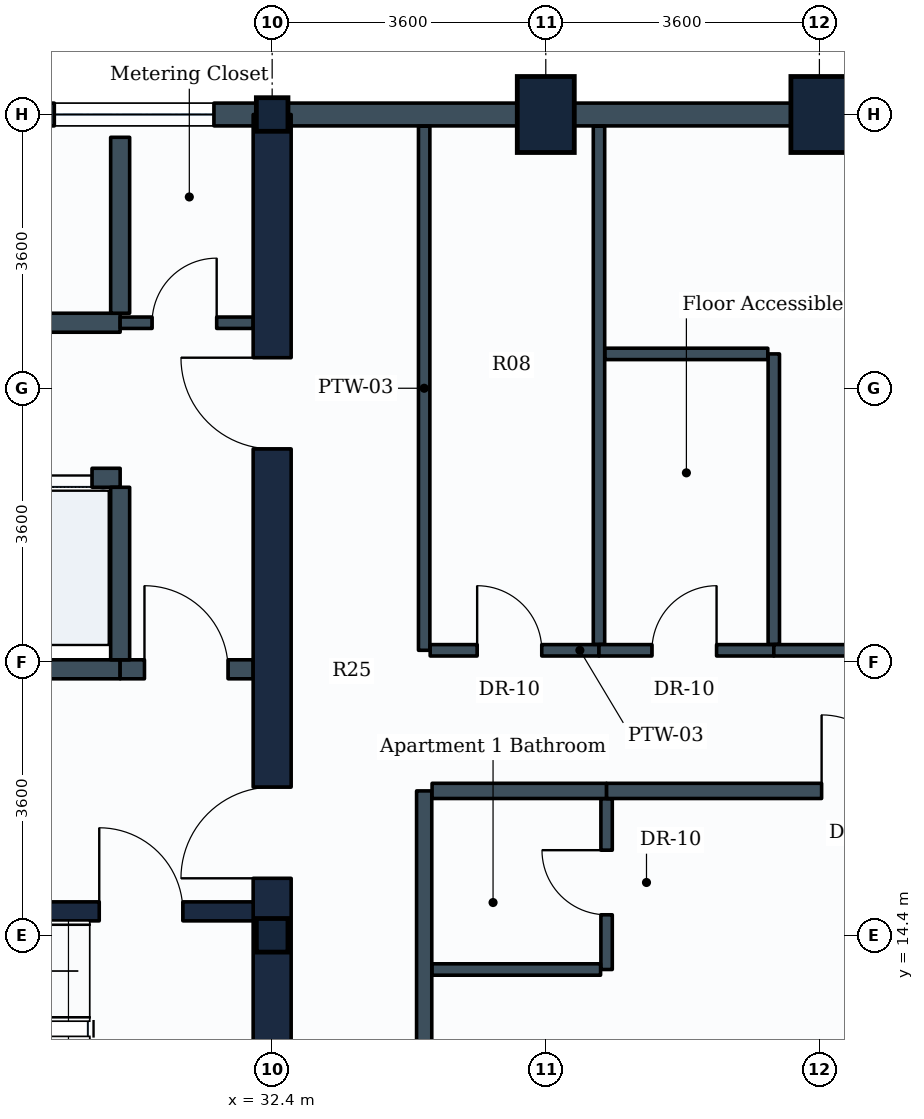
"""IFC4 building model, lengths in metres.
Left out: names, types, materials, properties, quantities, classifications, styles, units other than length and angle.
Written with IfcOpenShell. Run it as: python <this file> out.ifc"""

import sys

from ifc_helpers import new_model, si_unit, direction, frame, frame_2d, origin, origin_2d, place, context, subcontext, project, spatial, rectangle, i_section, extrude, element, fill, save


model = new_model("IFC4")
c1 = context("Model", 3, precision=1e-05, world=origin(), true_north=direction((0.0, 1.0)))
c2 = subcontext(c1, "Body", "Model", "MODEL_VIEW")
j1 = project(units=[si_unit("LENGTHUNIT", "METRE"), si_unit("PLANEANGLEUNIT", "RADIAN")], contexts=[c1])
p1 = place(None, origin())
s1 = spatial("IfcSite", under=j1, at=p1, CompositionType="ELEMENT")
p2 = place(p1, origin())
s2 = spatial("IfcBuilding", under=s1, at=p2, CompositionType="ELEMENT")
p3 = place(p2, frame((0.0, 0.0, 161.8)))
s3 = spatial("IfcBuildingStorey", under=s2, at=p3, CompositionType="ELEMENT", Elevation=161.8)
for number, where, z_axis, x_axis in (
    (1, (32.4, 14.4, 0.0), (0.0, 0.0, 1.0), (1.0, 0.0, 0.0)),
    (2, (32.4, 25.2, 0.0), (0.0, 0.0, 1.0), (1.0, 0.0, 0.0)),
):
    element("IfcColumn", number, at=place(p3, frame(where, z_axis=z_axis, x_axis=x_axis)), inside=s3, PredefinedType="COLUMN", context=c2, shape_type="SweptSolid", body=[
        extrude(i_section(OverallWidth=0.416, OverallDepth=0.442, WebThickness=0.025, FlangeThickness=0.041, FilletRadius=0.015, at=origin_2d()), origin(), (0.0, 0.0, 1.0), 3.8),
    ])
for number, where, z_axis, x_axis in (
    (3, (36.0, 25.2, 0.0), (0.0, 0.0, 1.0), (1.0, 0.0, 0.0)),
    (4, (39.6, 25.2, 0.0), (0.0, 0.0, 1.0), (1.0, 0.0, 0.0)),
):
    element("IfcColumn", number, at=place(p3, frame(where, z_axis=z_axis, x_axis=x_axis)), inside=s3, PredefinedType="COLUMN", context=c2, shape_type="SweptSolid", body=[
        extrude(rectangle(XDim=0.75, YDim=1.0, at=origin_2d()), origin(), (0.0, 0.0, 1.0), 3.8),
    ])
p4 = place(p3, frame((39.6, 25.2, 0.0), z_axis=(0.0, 0.0, 1.0), x_axis=(1.0, 0.0, 0.0)))
e5 = element("IfcWall", 5, at=p4, inside=s3, PredefinedType="STANDARD", context=c2, shape_type="SweptSolid", body=[
    extrude(rectangle(XDim=3.6, YDim=0.3, at=frame_2d((1.8, 0.0))), origin(), (0.0, 0.0, 1.0), 2.93),
])
p5 = place(p4, frame((0.75, 0.0, 0.85)))
e6 = element("IfcOpeningElement", 6, at=p5, cuts=e5, PredefinedType="OPENING", context=c2, shape_type="SweptSolid", body=[
    extrude(rectangle(XDim=2.1, YDim=1.35, at=frame_2d((1.05, 0.675))), frame((0.0, 0.16, 0.0), z_axis=(0.0, -1.0, 0.0), x_axis=(1.0, 0.0, 0.0)), (0.0, 0.0, 1.0), 0.32),
])
for number, where, z_axis, x_axis in (
    (7, (36.0, 25.2, 0.0), (0.0, 0.0, 1.0), (1.0, 0.0, 0.0)),
    (8, (32.4, 25.2, 0.0), (0.0, 0.0, 1.0), (1.0, 0.0, 0.0)),
):
    element("IfcWall", number, at=place(p3, frame(where, z_axis=z_axis, x_axis=x_axis)), inside=s3, PredefinedType="STANDARD", context=c2, shape_type="SweptSolid", body=[
        extrude(rectangle(XDim=3.6, YDim=0.3, at=frame_2d((1.8, 0.0))), origin(), (0.0, 0.0, 1.0), 2.93),
    ])
p6 = place(p3, frame((28.8, 25.2, 0.0), z_axis=(0.0, 0.0, 1.0), x_axis=(1.0, 0.0, 0.0)))
e9 = element("IfcWall", 9, at=p6, inside=s3, PredefinedType="STANDARD", context=c2, shape_type="SweptSolid", body=[
    extrude(rectangle(XDim=3.6, YDim=0.3, at=frame_2d((1.8, 0.0))), origin(), (0.0, 0.0, 1.0), 3.535),
])
p7 = place(p6, frame((0.734, 0.0, 0.85)))
e10 = element("IfcOpeningElement", 10, at=p7, cuts=e9, PredefinedType="OPENING", context=c2, shape_type="SweptSolid", body=[
    extrude(rectangle(XDim=2.1, YDim=1.35, at=frame_2d((1.05, 0.675))), frame((0.0, 0.16, 0.0), z_axis=(0.0, -1.0, 0.0), x_axis=(1.0, 0.0, 0.0)), (0.0, 0.0, 1.0), 0.32),
])
p8 = place(p3, frame((32.4, 10.8, 0.0), z_axis=(0.0, 0.0, 1.0), x_axis=(0.0, 1.0, 0.0)))
e11 = element("IfcWall", 11, at=p8, inside=s3, PredefinedType="SHEAR", context=c2, shape_type="SweptSolid", body=[
    extrude(rectangle(XDim=14.4, YDim=0.5, at=frame_2d((7.2, 0.0))), origin(), (0.0, 0.0, 1.0), 3.55),
])
p9 = place(p8, frame((4.35, 0.0, 0.0)))
e12 = element("IfcOpeningElement", 12, at=p9, cuts=e11, PredefinedType="OPENING", context=c2, shape_type="SweptSolid", body=[
    extrude(rectangle(XDim=1.2, YDim=2.1, at=frame_2d((0.6, 1.05))), frame((0.0, 0.26, 0.0), z_axis=(0.0, -1.0, 0.0), x_axis=(1.0, 0.0, 0.0)), (0.0, 0.0, 1.0), 0.52),
])
p10 = place(p8, frame((10.0, 0.0, 0.0)))
e13 = element("IfcOpeningElement", 13, at=p10, cuts=e11, PredefinedType="OPENING", context=c2, shape_type="SweptSolid", body=[
    extrude(rectangle(XDim=1.2, YDim=2.1, at=frame_2d((0.6, 1.05))), frame((0.0, 0.26, 0.0), z_axis=(0.0, -1.0, 0.0), x_axis=(1.0, 0.0, 0.0)), (0.0, 0.0, 1.0), 0.52),
])
p11 = place(p3, frame((23.35, 14.715, 0.0), z_axis=(0.0, 0.0, 1.0), x_axis=(1.0, 0.0, 0.0)))
e14 = element("IfcWall", 14, at=p11, inside=s3, PredefinedType="SHEAR", context=c2, shape_type="SweptSolid", body=[
    extrude(rectangle(XDim=8.8, YDim=0.25, at=frame_2d((4.4, 0.0))), origin(), (0.0, 0.0, 1.0), 3.55),
])
p12 = place(p11, frame((6.775, 0.0, 0.0)))
e15 = element("IfcOpeningElement", 15, at=p12, cuts=e14, PredefinedType="OPENING", context=c2, shape_type="SweptSolid", body=[
    extrude(rectangle(XDim=1.1, YDim=2.1, at=frame_2d((0.55, 1.05))), frame((0.0, 0.135, 0.0), z_axis=(0.0, -1.0, 0.0), x_axis=(1.0, 0.0, 0.0)), (0.0, 0.0, 1.0), 0.27),
])
p13 = place(p3, frame((21.88, 17.9, 0.0), z_axis=(0.0, 0.0, 1.0), x_axis=(1.0, 0.0, 0.0)))
e16 = element("IfcWall", 16, at=p13, inside=s3, PredefinedType="PARTITIONING", context=c2, shape_type="SweptSolid", body=[
    extrude(rectangle(XDim=8.52, YDim=0.25, at=frame_2d((4.26, 0.0))), origin(), (0.0, 0.0, 1.0), 3.535),
])
p14 = place(p3, frame((30.4, 17.9, 0.0), z_axis=(0.0, 0.0, 1.0), x_axis=(1.0, 0.0, 0.0)))
e17 = element("IfcWall", 17, at=p14, inside=s3, PredefinedType="PARTITIONING", context=c2, shape_type="SweptSolid", body=[
    extrude(rectangle(XDim=1.75, YDim=0.25, at=frame_2d((0.875, 0.0))), origin(), (0.0, 0.0, 1.0), 3.535),
])
p15 = place(p14, frame((0.32, 0.0, 0.0)))
e18 = element("IfcOpeningElement", 18, at=p15, cuts=e17, PredefinedType="OPENING", context=c2, shape_type="SweptSolid", body=[
    extrude(rectangle(XDim=1.1, YDim=2.1, at=frame_2d((0.55, 1.05))), frame((0.0, 0.135, 0.0), z_axis=(0.0, -1.0, 0.0), x_axis=(1.0, 0.0, 0.0)), (0.0, 0.0, 1.0), 0.27),
])
p16 = place(p3, frame((23.18, 20.42, 0.0), z_axis=(0.0, 0.0, 1.0), x_axis=(1.0, 0.0, 0.0)))
e19 = element("IfcWall", 19, at=p16, inside=s3, PredefinedType="PARTITIONING", context=c2, shape_type="SweptSolid", body=[
    extrude(rectangle(XDim=7.22, YDim=0.25, at=frame_2d((3.61, 0.0))), origin(), (0.0, 0.0, 1.0), 3.535),
])
p17 = place(p16, frame((0.41, 0.0, 0.0)))
e20 = element("IfcOpeningElement", 20, at=p17, cuts=e19, PredefinedType="OPENING", context=c2, shape_type="SweptSolid", body=[
    extrude(rectangle(XDim=1.1, YDim=2.1, at=frame_2d((0.55, 1.05))), frame((0.0, 0.135, 0.0), z_axis=(0.0, -1.0, 0.0), x_axis=(1.0, 0.0, 0.0)), (0.0, 0.0, 1.0), 0.27),
])
p18 = place(p16, frame((2.19, 0.0, 0.0)))
e21 = element("IfcOpeningElement", 21, at=p18, cuts=e19, PredefinedType="OPENING", context=c2, shape_type="SweptSolid", body=[
    extrude(rectangle(XDim=1.1, YDim=2.1, at=frame_2d((0.55, 1.05))), frame((0.0, 0.135, 0.0), z_axis=(0.0, -1.0, 0.0), x_axis=(1.0, 0.0, 0.0)), (0.0, 0.0, 1.0), 0.27),
])
p19 = place(p16, frame((3.97, 0.0, 0.0)))
e22 = element("IfcOpeningElement", 22, at=p19, cuts=e19, PredefinedType="OPENING", context=c2, shape_type="SweptSolid", body=[
    extrude(rectangle(XDim=1.1, YDim=2.1, at=frame_2d((0.55, 1.05))), frame((0.0, 0.135, 0.0), z_axis=(0.0, -1.0, 0.0), x_axis=(1.0, 0.0, 0.0)), (0.0, 0.0, 1.0), 0.27),
])
p20 = place(p16, frame((5.75, 0.0, 0.0)))
e23 = element("IfcOpeningElement", 23, at=p20, cuts=e19, PredefinedType="OPENING", context=c2, shape_type="SweptSolid", body=[
    extrude(rectangle(XDim=1.1, YDim=2.1, at=frame_2d((0.55, 1.05))), frame((0.0, 0.135, 0.0), z_axis=(0.0, -1.0, 0.0), x_axis=(1.0, 0.0, 0.0)), (0.0, 0.0, 1.0), 0.27),
])
p21 = place(p3, frame((30.4, 18.025, 0.0), z_axis=(0.0, 0.0, 1.0), x_axis=(0.0, 1.0, 0.0)))
e24 = element("IfcWall", 24, at=p21, inside=s3, PredefinedType="PARTITIONING", context=c2, shape_type="SweptSolid", body=[
    extrude(rectangle(XDim=2.27, YDim=0.25, at=frame_2d((1.135, 0.0))), origin(), (0.0, 0.0, 1.0), 3.535),
])
p22 = place(p3, frame((23.18, 22.46, 0.0), z_axis=(0.0, 0.0, 1.0), x_axis=(1.0, 0.0, 0.0)))
e25 = element("IfcWall", 25, at=p22, inside=s3, PredefinedType="PARTITIONING", context=c2, shape_type="SweptSolid", body=[
    extrude(rectangle(XDim=7.22, YDim=0.25, at=frame_2d((3.61, 0.0))), origin(), (0.0, 0.0, 1.0), 3.535),
])
p23 = place(p3, frame((30.4, 22.585, 0.0), z_axis=(0.0, 0.0, 1.0), x_axis=(0.0, 1.0, 0.0)))
e26 = element("IfcWall", 26, at=p23, inside=s3, PredefinedType="PARTITIONING", context=c2, shape_type="SweptSolid", body=[
    extrude(rectangle(XDim=2.315, YDim=0.25, at=frame_2d((1.157, 0.0))), origin(), (0.0, 0.0, 1.0), 3.535),
])
p24 = place(p3, frame((30.4, 22.46, 0.0), z_axis=(0.0, 0.0, 1.0), x_axis=(1.0, 0.0, 0.0)))
e27 = element("IfcWall", 27, at=p24, inside=s3, PredefinedType="PARTITIONING", context=c2, shape_type="SweptSolid", body=[
    extrude(rectangle(XDim=1.75, YDim=0.15, at=frame_2d((0.875, 0.0))), origin(), (0.0, 0.0, 1.0), 3.535),
])
p25 = place(p24, frame((0.42, 0.0, 0.0)))
e28 = element("IfcOpeningElement", 28, at=p25, cuts=e27, PredefinedType="OPENING", context=c2, shape_type="SweptSolid", body=[
    extrude(rectangle(XDim=0.85, YDim=2.1, at=frame_2d((0.425, 1.05))), frame((0.0, 0.085, 0.0), z_axis=(0.0, -1.0, 0.0), x_axis=(1.0, 0.0, 0.0)), (0.0, 0.0, 1.0), 0.17),
])
p26 = place(p3, frame((34.4, 18.15, 0.0), z_axis=(0.0, 0.0, 1.0), x_axis=(0.0, 1.0, 0.0)))
e29 = element("IfcWall", 29, at=p26, inside=s3, PredefinedType="PARTITIONING", context=c2, shape_type="SweptSolid", body=[
    extrude(rectangle(XDim=6.896, YDim=0.15, at=frame_2d((3.448, 0.0))), origin(), (0.0, 0.0, 1.0), 2.93),
])
p27 = place(p3, frame((34.479, 18.15, 0.0), z_axis=(0.0, 0.0, 1.0), x_axis=(1.0, 0.0, 0.0)))
e30 = element("IfcWall", 30, at=p27, inside=s3, PredefinedType="PARTITIONING", context=c2, shape_type="SweptSolid", body=[
    extrude(rectangle(XDim=2.221, YDim=0.15, at=frame_2d((1.11, 0.0))), origin(), (0.0, 0.0, 1.0), 3.17),
])
p28 = place(p27, frame((0.618, 0.0, 0.0)))
e31 = element("IfcOpeningElement", 31, at=p28, cuts=e30, PredefinedType="OPENING", context=c2, shape_type="SweptSolid", body=[
    extrude(rectangle(XDim=0.85, YDim=2.1, at=frame_2d((0.425, 1.05))), frame((0.0, 0.085, 0.0), z_axis=(0.0, -1.0, 0.0), x_axis=(1.0, 0.0, 0.0)), (0.0, 0.0, 1.0), 0.17),
])
p29 = place(p3, frame((36.7, 18.229, 0.0), z_axis=(0.0, 0.0, 1.0), x_axis=(0.0, 1.0, 0.0)))
e32 = element("IfcWall", 32, at=p29, inside=s3, PredefinedType="PARTITIONING", context=c2, shape_type="SweptSolid", body=[
    extrude(rectangle(XDim=6.817, YDim=0.15, at=frame_2d((3.408, 0.0))), origin(), (0.0, 0.0, 1.0), 2.93),
])
p30 = place(p3, frame((36.7, 18.15, 0.0), z_axis=(0.0, 0.0, 1.0), x_axis=(1.0, 0.0, 0.0)))
e33 = element("IfcWall", 33, at=p30, inside=s3, PredefinedType="PARTITIONING", context=c2, shape_type="SweptSolid", body=[
    extrude(rectangle(XDim=2.3, YDim=0.15, at=frame_2d((1.15, 0.0))), origin(), (0.0, 0.0, 1.0), 3.17),
])
p31 = place(p30, frame((0.697, 0.0, 0.0)))
e34 = element("IfcOpeningElement", 34, at=p31, cuts=e33, PredefinedType="OPENING", context=c2, shape_type="SweptSolid", body=[
    extrude(rectangle(XDim=0.85, YDim=2.1, at=frame_2d((0.425, 1.05))), frame((0.0, 0.085, 0.0), z_axis=(0.0, -1.0, 0.0), x_axis=(1.0, 0.0, 0.0)), (0.0, 0.0, 1.0), 0.17),
])
p32 = place(p3, frame((39.0, 18.229, 0.0), z_axis=(0.0, 0.0, 1.0), x_axis=(0.0, 1.0, 0.0)))
e35 = element("IfcWall", 35, at=p32, inside=s3, PredefinedType="PARTITIONING", context=c2, shape_type="SweptSolid", body=[
    extrude(rectangle(XDim=3.821, YDim=0.15, at=frame_2d((1.911, 0.0))), origin(), (0.0, 0.0, 1.0), 3.17),
])
p33 = place(p3, frame((36.779, 22.05, 0.0), z_axis=(0.0, 0.0, 1.0), x_axis=(1.0, 0.0, 0.0)))
e36 = element("IfcWall", 36, at=p33, inside=s3, PredefinedType="PARTITIONING", context=c2, shape_type="SweptSolid", body=[
    extrude(rectangle(XDim=2.142, YDim=0.15, at=frame_2d((1.071, 0.0))), origin(), (0.0, 0.0, 1.0), 3.535),
])
p34 = place(p3, frame((34.4, 3.754, 0.0), z_axis=(0.0, 0.0, 1.0), x_axis=(0.0, 1.0, 0.0)))
e37 = element("IfcWall", 37, at=p34, inside=s3, PredefinedType="PARTITIONING", context=c2, shape_type="SweptSolid", body=[
    extrude(rectangle(XDim=12.546, YDim=0.2, at=frame_2d((6.273, 0.0))), origin(), (0.0, 0.0, 1.0), 2.93),
])
p35 = place(p3, frame((34.504, 16.3, 0.0), z_axis=(0.0, 0.0, 1.0), x_axis=(1.0, 0.0, 0.0)))
e38 = element("IfcWall", 38, at=p35, inside=s3, PredefinedType="PARTITIONING", context=c2, shape_type="SweptSolid", body=[
    extrude(rectangle(XDim=2.296, YDim=0.2, at=frame_2d((1.148, 0.0))), origin(), (0.0, 0.0, 1.0), 3.22),
])
p36 = place(p3, frame((36.8, 13.95, 0.0), z_axis=(0.0, 0.0, 1.0), x_axis=(0.0, 1.0, 0.0)))
e39 = element("IfcWall", 39, at=p36, inside=s3, PredefinedType="PARTITIONING", context=c2, shape_type="SweptSolid", body=[
    extrude(rectangle(XDim=2.246, YDim=0.15, at=frame_2d((1.123, 0.0))), origin(), (0.0, 0.0, 1.0), 3.17),
])
p37 = place(p36, frame((0.72, 0.0, 0.0)))
e40 = element("IfcOpeningElement", 40, at=p37, cuts=e39, PredefinedType="OPENING", context=c2, shape_type="SweptSolid", body=[
    extrude(rectangle(XDim=0.85, YDim=2.1, at=frame_2d((0.425, 1.05))), frame((0.0, 0.085, 0.0), z_axis=(0.0, -1.0, 0.0), x_axis=(1.0, 0.0, 0.0)), (0.0, 0.0, 1.0), 0.17),
])
p38 = place(p3, frame((34.504, 13.95, 0.0), z_axis=(0.0, 0.0, 1.0), x_axis=(1.0, 0.0, 0.0)))
e41 = element("IfcWall", 41, at=p38, inside=s3, PredefinedType="PARTITIONING", context=c2, shape_type="SweptSolid", body=[
    extrude(rectangle(XDim=2.217, YDim=0.15, at=frame_2d((1.108, 0.0))), origin(), (0.0, 0.0, 1.0), 3.22),
])
p39 = place(p3, frame((36.8, 16.3, 0.0), z_axis=(0.0, 0.0, 1.0), x_axis=(1.0, 0.0, 0.0)))
e42 = element("IfcWall", 42, at=p39, inside=s3, PredefinedType="PARTITIONING", context=c2, shape_type="SweptSolid", body=[
    extrude(rectangle(XDim=8.146, YDim=0.2, at=frame_2d((4.073, 0.0))), origin(), (0.0, 0.0, 1.0), 3.17),
])
p40 = place(p39, frame((2.829, 0.0, 0.0)))
e43 = element("IfcOpeningElement", 43, at=p40, cuts=e42, PredefinedType="OPENING", context=c2, shape_type="SweptSolid", body=[
    extrude(rectangle(XDim=1.0, YDim=2.1, at=frame_2d((0.5, 1.05))), frame((0.0, 0.11, 0.0), z_axis=(0.0, -1.0, 0.0), x_axis=(1.0, 0.0, 0.0)), (0.0, 0.0, 1.0), 0.22),
])
p41 = place(p3, frame((39.0, 18.15, 0.0), z_axis=(0.0, 0.0, 1.0), x_axis=(1.0, 0.0, 0.0)))
e44 = element("IfcWall", 44, at=p41, inside=s3, PredefinedType="PARTITIONING", context=c2, shape_type="SweptSolid", body=[
    extrude(rectangle(XDim=7.396, YDim=0.15, at=frame_2d((3.698, 0.0))), origin(), (0.0, 0.0, 1.0), 3.17),
])
p42 = place(p41, frame((3.29, 0.0, 0.0)))
e45 = element("IfcOpeningElement", 45, at=p42, cuts=e44, PredefinedType="OPENING", context=c2, shape_type="SweptSolid", body=[
    extrude(rectangle(XDim=1.0, YDim=2.1, at=frame_2d((0.5, 1.05))), frame((0.0, 0.085, 0.0), z_axis=(0.0, -1.0, 0.0), x_axis=(1.0, 0.0, 0.0)), (0.0, 0.0, 1.0), 0.17),
])
p43 = place(p7, origin())
e46 = element("IfcWindow", 46, at=p43, inside=s3, PartitioningType="SINGLE_PANEL", PredefinedType="WINDOW", context=c2, shape_type="SweptSolid", body=[
    extrude(rectangle(XDim=2.1, YDim=1.35, at=frame_2d((1.05, 0.675))), frame((0.0, 0.03, 0.0), z_axis=(0.0, -1.0, 0.0), x_axis=(1.0, 0.0, 0.0)), (0.0, 0.0, 1.0), 0.06),
])
fill(e10, e46)
p44 = place(p12, origin())
e47 = element("IfcDoor", 47, at=p44, inside=s3, OperationType="SINGLE_SWING_LEFT", PredefinedType="DOOR", context=c2, shape_type="SweptSolid", body=[
    extrude(rectangle(XDim=1.1, YDim=2.1, at=frame_2d((0.55, 1.05))), frame((0.0, 0.025, 0.0), z_axis=(0.0, -1.0, 0.0), x_axis=(1.0, 0.0, 0.0)), (0.0, 0.0, 1.0), 0.05),
])
fill(e15, e47)
p45 = place(p9, origin())
e48 = element("IfcDoor", 48, at=p45, inside=s3, OperationType="SINGLE_SWING_LEFT", PredefinedType="DOOR", context=c2, shape_type="SweptSolid", body=[
    extrude(rectangle(XDim=1.2, YDim=2.1, at=frame_2d((0.6, 1.05))), frame((0.0, 0.025, 0.0), z_axis=(0.0, -1.0, 0.0), x_axis=(1.0, 0.0, 0.0)), (0.0, 0.0, 1.0), 0.05),
])
fill(e12, e48)
p46 = place(p15, origin())
e49 = element("IfcDoor", 49, at=p46, inside=s3, OperationType="SINGLE_SWING_LEFT", PredefinedType="DOOR", context=c2, shape_type="SweptSolid", body=[
    extrude(rectangle(XDim=1.1, YDim=2.1, at=frame_2d((0.55, 1.05))), frame((0.0, 0.025, 0.0), z_axis=(0.0, -1.0, 0.0), x_axis=(1.0, 0.0, 0.0)), (0.0, 0.0, 1.0), 0.05),
])
fill(e18, e49)
p47 = place(p20, origin())
e50 = element("IfcDoor", 50, at=p47, inside=s3, OperationType="SLIDING_TO_LEFT", PredefinedType="DOOR", context=c2, shape_type="SweptSolid", body=[
    extrude(rectangle(XDim=1.1, YDim=2.1, at=frame_2d((0.55, 1.05))), frame((0.0, 0.025, 0.0), z_axis=(0.0, -1.0, 0.0), x_axis=(1.0, 0.0, 0.0)), (0.0, 0.0, 1.0), 0.05),
])
fill(e23, e50)
p48 = place(p10, origin())
e51 = element("IfcDoor", 51, at=p48, inside=s3, OperationType="SINGLE_SWING_RIGHT", PredefinedType="DOOR", context=c2, shape_type="SweptSolid", body=[
    extrude(rectangle(XDim=1.2, YDim=2.1, at=frame_2d((0.6, 1.05))), frame((0.0, 0.025, 0.0), z_axis=(0.0, -1.0, 0.0), x_axis=(1.0, 0.0, 0.0)), (0.0, 0.0, 1.0), 0.05),
])
fill(e13, e51)
p49 = place(p25, origin())
e52 = element("IfcDoor", 52, at=p49, inside=s3, OperationType="SINGLE_SWING_RIGHT", PredefinedType="DOOR", context=c2, shape_type="SweptSolid", body=[
    extrude(rectangle(XDim=0.85, YDim=2.1, at=frame_2d((0.425, 1.05))), frame((0.0, 0.025, 0.0), z_axis=(0.0, -1.0, 0.0), x_axis=(1.0, 0.0, 0.0)), (0.0, 0.0, 1.0), 0.05),
])
fill(e28, e52)
p50 = place(p28, origin())
e53 = element("IfcDoor", 53, at=p50, inside=s3, OperationType="SINGLE_SWING_LEFT", PredefinedType="DOOR", context=c2, shape_type="SweptSolid", body=[
    extrude(rectangle(XDim=0.85, YDim=2.1, at=frame_2d((0.425, 1.05))), frame((0.0, 0.025, 0.0), z_axis=(0.0, -1.0, 0.0), x_axis=(1.0, 0.0, 0.0)), (0.0, 0.0, 1.0), 0.05),
])
fill(e31, e53)
p51 = place(p31, origin())
e54 = element("IfcDoor", 54, at=p51, inside=s3, OperationType="SINGLE_SWING_RIGHT", PredefinedType="DOOR", context=c2, shape_type="SweptSolid", body=[
    extrude(rectangle(XDim=0.85, YDim=2.1, at=frame_2d((0.425, 1.05))), frame((0.0, 0.025, 0.0), z_axis=(0.0, -1.0, 0.0), x_axis=(1.0, 0.0, 0.0)), (0.0, 0.0, 1.0), 0.05),
])
fill(e34, e54)
p52 = place(p37, origin())
e55 = element("IfcDoor", 55, at=p52, inside=s3, OperationType="SINGLE_SWING_RIGHT", PredefinedType="DOOR", context=c2, shape_type="SweptSolid", body=[
    extrude(rectangle(XDim=0.85, YDim=2.1, at=frame_2d((0.425, 1.05))), frame((0.0, 0.025, 0.0), z_axis=(0.0, -1.0, 0.0), x_axis=(1.0, 0.0, 0.0)), (0.0, 0.0, 1.0), 0.05),
])
fill(e40, e55)
p53 = place(p40, origin())
e56 = element("IfcDoor", 56, at=p53, inside=s3, OperationType="SINGLE_SWING_LEFT", PredefinedType="DOOR", context=c2, shape_type="SweptSolid", body=[
    extrude(rectangle(XDim=1.0, YDim=2.1, at=frame_2d((0.5, 1.05))), frame((0.0, 0.025, 0.0), z_axis=(0.0, -1.0, 0.0), x_axis=(1.0, 0.0, 0.0)), (0.0, 0.0, 1.0), 0.05),
])
fill(e43, e56)
save(model, sys.argv[1])
